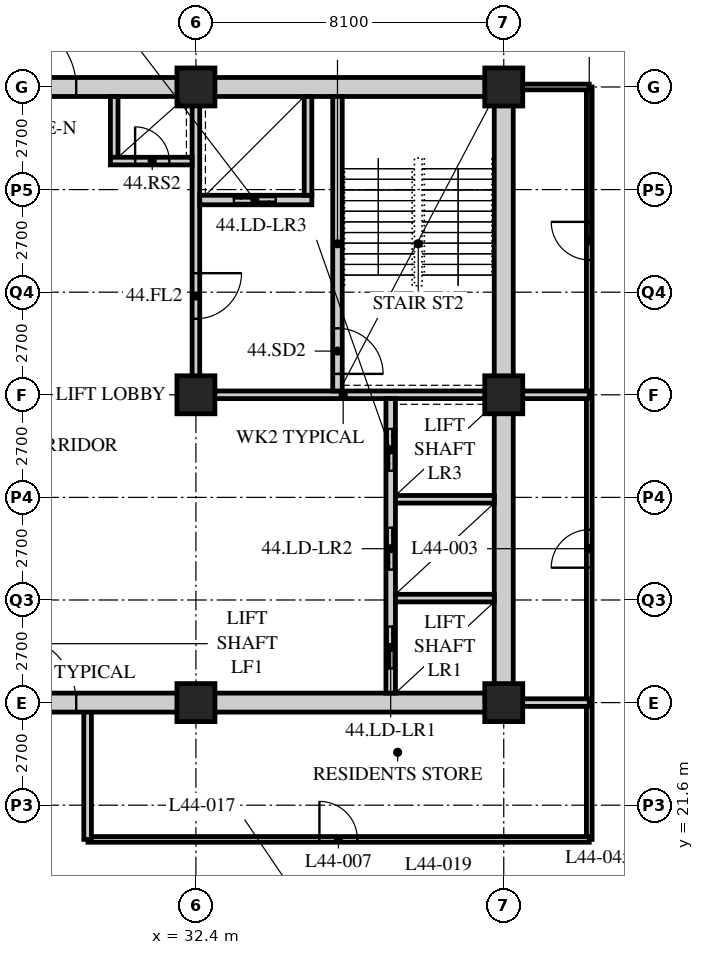
"""IFC4 building model, lengths in metres.
Left out: names, types, materials, properties, quantities, classifications, styles, units other than length and angle.
Written with IfcOpenShell. Run it as: python <this file> out.ifc"""

import sys

from ifc_helpers import new_model, si_unit, direction, frame, frame_2d, origin, origin_2d, place, context, subcontext, project, spatial, rectangle, hollow_rectangle, extrude, element, fill, save


model = new_model("IFC4")
c1 = context("Model", 3, precision=1e-05, world=origin(), true_north=direction((0.0, 1.0)))
c2 = subcontext(c1, "Body", "Model", "MODEL_VIEW")
j1 = project(units=[si_unit("LENGTHUNIT", "METRE"), si_unit("PLANEANGLEUNIT", "RADIAN")], contexts=[c1])
p1 = place(None, origin())
s1 = spatial("IfcSite", under=j1, at=p1, CompositionType="ELEMENT")
p2 = place(p1, origin())
s2 = spatial("IfcBuilding", under=s1, at=p2, CompositionType="ELEMENT")
p3 = place(p2, frame((0.0, 0.0, 174.0)))
s3 = spatial("IfcBuildingStorey", under=s2, at=p3, CompositionType="ELEMENT", Elevation=174.0)
for number, where, z_axis, x_axis in (
    (1, (32.4, 24.3, 0.0), (0.0, 0.0, 1.0), (1.0, 0.0, 0.0)),
    (2, (32.4, 32.4, 0.0), (0.0, 0.0, 1.0), (1.0, 0.0, 0.0)),
    (3, (32.4, 40.5, 0.0), (0.0, 0.0, 1.0), (1.0, 0.0, 0.0)),
    (4, (40.5, 24.3, 0.0), (0.0, 0.0, 1.0), (1.0, 0.0, 0.0)),
    (5, (40.5, 32.4, 0.0), (0.0, 0.0, 1.0), (1.0, 0.0, 0.0)),
    (6, (40.5, 40.5, 0.0), (0.0, 0.0, 1.0), (1.0, 0.0, 0.0)),
):
    element("IfcColumn", number, at=place(p3, frame(where, z_axis=z_axis, x_axis=x_axis)), inside=s3, PredefinedType="COLUMN", context=c2, shape_type="SweptSolid", body=[
        extrude(hollow_rectangle(XDim=1.0, YDim=1.0, WallThickness=0.1, at=origin_2d()), origin(), (0.0, 0.0, 1.0), 3.6),
    ])
p4 = place(p3, frame((42.75, 20.7, 0.0), z_axis=(0.0, 0.0, 1.0), x_axis=(0.0, 1.0, 0.0)))
e7 = element("IfcWall", 7, at=p4, inside=s3, PredefinedType="PARTITIONING", context=c2, shape_type="SweptSolid", body=[
    extrude(rectangle(XDim=19.8, YDim=0.15, at=frame_2d((9.9, 0.0))), origin(), (0.0, 0.0, 1.0), 3.39),
])
p5 = place(p4, frame((7.15, 0.0, 0.0)))
e8 = element("IfcOpeningElement", 8, at=p5, cuts=e7, PredefinedType="OPENING", context=c2, shape_type="SweptSolid", body=[
    extrude(rectangle(XDim=1.0, YDim=2.1, at=frame_2d((0.5, 1.05))), frame((0.0, 0.085, 0.0), z_axis=(0.0, -1.0, 0.0), x_axis=(1.0, 0.0, 0.0)), (0.0, 0.0, 1.0), 0.17),
])
p6 = place(p4, frame((15.25, 0.0, 0.0)))
e9 = element("IfcOpeningElement", 9, at=p6, cuts=e7, PredefinedType="OPENING", context=c2, shape_type="SweptSolid", body=[
    extrude(rectangle(XDim=1.0, YDim=2.1, at=frame_2d((0.5, 1.05))), frame((0.0, 0.085, 0.0), z_axis=(0.0, -1.0, 0.0), x_axis=(1.0, 0.0, 0.0)), (0.0, 0.0, 1.0), 0.17),
])
p7 = place(p3, frame((42.75, 40.5, 0.0), z_axis=(0.0, 0.0, 1.0), x_axis=(-1.0, 0.0, 0.0)))
e10 = element("IfcWall", 10, at=p7, inside=s3, PredefinedType="PARTITIONING", context=c2, shape_type="SweptSolid", body=[
    extrude(rectangle(XDim=2.05, YDim=0.15, at=frame_2d((1.025, 0.0))), origin(), (0.0, 0.0, 1.0), 3.39),
])
p8 = place(p3, frame((29.56, 20.7, 0.0), z_axis=(0.0, 0.0, 1.0), x_axis=(1.0, 0.0, 0.0)))
e11 = element("IfcWall", 11, at=p8, inside=s3, PredefinedType="PARTITIONING", context=c2, shape_type="SweptSolid", body=[
    extrude(rectangle(XDim=13.19, YDim=0.15, at=frame_2d((6.595, 0.0))), origin(), (0.0, 0.0, 1.0), 3.39),
])
p9 = place(p8, frame((6.09, 0.0, 0.0)))
e12 = element("IfcOpeningElement", 12, at=p9, cuts=e11, PredefinedType="OPENING", context=c2, shape_type="SweptSolid", body=[
    extrude(rectangle(XDim=1.0, YDim=2.1, at=frame_2d((0.5, 1.05))), frame((0.0, 0.085, 0.0), z_axis=(0.0, -1.0, 0.0), x_axis=(1.0, 0.0, 0.0)), (0.0, 0.0, 1.0), 0.17),
])
p10 = place(p3, frame((40.5, 32.4, 0.0), z_axis=(0.0, 0.0, 1.0), x_axis=(1.0, 0.0, 0.0)))
e13 = element("IfcWall", 13, at=p10, inside=s3, PredefinedType="SOLIDWALL", context=c2, shape_type="SweptSolid", body=[
    extrude(rectangle(XDim=2.25, YDim=0.2, at=frame_2d((1.125, 0.0))), origin(), (0.0, 0.0, 1.0), 3.39),
])
p11 = place(p3, frame((29.55, 20.7, 0.0), z_axis=(0.0, 0.0, 1.0), x_axis=(0.0, 1.0, 0.0)))
e14 = element("IfcWall", 14, at=p11, inside=s3, PredefinedType="SOLIDWALL", context=c2, shape_type="SweptSolid", body=[
    extrude(rectangle(XDim=3.6, YDim=0.2, at=frame_2d((1.8, 0.0))), origin(), (0.0, 0.0, 1.0), 3.39),
])
p12 = place(p3, frame((40.5, 24.3, 0.0), z_axis=(0.0, 0.0, 1.0), x_axis=(1.0, 0.0, 0.0)))
e15 = element("IfcWall", 15, at=p12, inside=s3, PredefinedType="SOLIDWALL", context=c2, shape_type="SweptSolid", body=[
    extrude(rectangle(XDim=2.25, YDim=0.2, at=frame_2d((1.125, 0.0))), origin(), (0.0, 0.0, 1.0), 3.39),
])
p13 = place(p3, frame((15.95, 24.3, 0.0), z_axis=(0.0, 0.0, 1.0), x_axis=(1.0, 0.0, 0.0)))
e16 = element("IfcWall", 16, at=p13, inside=s3, PredefinedType="SOLIDWALL", context=c2, shape_type="SweptSolid", body=[
    extrude(rectangle(XDim=24.8, YDim=0.5, at=frame_2d((12.4, 0.0))), origin(), (0.0, 0.0, 1.0), 2.74),
])
p14 = place(p13, frame((11.5, 0.0, 0.0)))
e17 = element("IfcOpeningElement", 17, at=p14, cuts=e16, PredefinedType="OPENING", context=c2, shape_type="SweptSolid", body=[
    extrude(rectangle(XDim=1.8, YDim=2.4, at=frame_2d((0.9, 1.2))), frame((0.0, 0.26, 0.0), z_axis=(0.0, -1.0, 0.0), x_axis=(1.0, 0.0, 0.0)), (0.0, 0.0, 1.0), 0.52),
])
p15 = place(p3, frame((15.95, 40.5, 0.0), z_axis=(0.0, 0.0, 1.0), x_axis=(1.0, 0.0, 0.0)))
e18 = element("IfcWall", 18, at=p15, inside=s3, PredefinedType="SOLIDWALL", context=c2, shape_type="SweptSolid", body=[
    extrude(rectangle(XDim=24.8, YDim=0.5, at=frame_2d((12.4, 0.0))), origin(), (0.0, 0.0, 1.0), 2.74),
])
p16 = place(p15, frame((11.5, 0.0, 0.0)))
e19 = element("IfcOpeningElement", 19, at=p16, cuts=e18, PredefinedType="OPENING", context=c2, shape_type="SweptSolid", body=[
    extrude(rectangle(XDim=1.8, YDim=2.4, at=frame_2d((0.9, 1.2))), frame((0.0, 0.26, 0.0), z_axis=(0.0, -1.0, 0.0), x_axis=(1.0, 0.0, 0.0)), (0.0, 0.0, 1.0), 0.52),
])
p17 = place(p3, frame((40.5, 24.55, 0.0), z_axis=(0.0, 0.0, 1.0), x_axis=(0.0, 1.0, 0.0)))
e20 = element("IfcWall", 20, at=p17, inside=s3, PredefinedType="SOLIDWALL", context=c2, shape_type="SweptSolid", body=[
    extrude(rectangle(XDim=15.7, YDim=0.5, at=frame_2d((7.85, 0.0))), origin(), (0.0, 0.0, 1.0), 2.778),
])
p18 = place(p3, frame((32.3, 32.4, 0.0), z_axis=(0.0, 0.0, 1.0), x_axis=(1.0, 0.0, 0.0)))
e21 = element("IfcWall", 21, at=p18, inside=s3, PredefinedType="SOLIDWALL", context=c2, shape_type="SweptSolid", body=[
    extrude(rectangle(XDim=7.95, YDim=0.2, at=frame_2d((3.975, 0.0))), origin(), (0.0, 0.0, 1.0), 2.778),
])
p19 = place(p3, frame((32.4, 32.5, 0.0), z_axis=(0.0, 0.0, 1.0), x_axis=(0.0, 1.0, 0.0)))
e22 = element("IfcWall", 22, at=p19, inside=s3, PredefinedType="SOLIDWALL", context=c2, shape_type="SweptSolid", body=[
    extrude(rectangle(XDim=7.75, YDim=0.2, at=frame_2d((3.875, 0.0))), origin(), (0.0, 0.0, 1.0), 2.778),
])
p20 = place(p19, frame((1.9, 0.0, 0.0)))
e23 = element("IfcOpeningElement", 23, at=p20, cuts=e22, PredefinedType="OPENING", context=c2, shape_type="SweptSolid", body=[
    extrude(rectangle(XDim=1.2, YDim=2.1, at=frame_2d((0.6, 1.05))), frame((0.0, 0.11, 0.0), z_axis=(0.0, -1.0, 0.0), x_axis=(1.0, 0.0, 0.0)), (0.0, 0.0, 1.0), 0.22),
])
p21 = place(p3, frame((37.525, 24.55, 0.0), z_axis=(0.0, 0.0, 1.0), x_axis=(0.0, 1.0, 0.0)))
e24 = element("IfcWall", 24, at=p21, inside=s3, PredefinedType="SOLIDWALL", context=c2, shape_type="SweptSolid", body=[
    extrude(rectangle(XDim=7.75, YDim=0.25, at=frame_2d((3.875, 0.0))), origin(), (0.0, 0.0, 1.0), 3.39),
])
p22 = place(p21, frame((0.65, 0.0, 0.0)))
e25 = element("IfcOpeningElement", 25, at=p22, cuts=e24, PredefinedType="OPENING", context=c2, shape_type="SweptSolid", body=[
    extrude(rectangle(XDim=1.1, YDim=2.4, at=frame_2d((0.55, 1.2))), frame((0.0, 0.135, 0.0), z_axis=(0.0, -1.0, 0.0), x_axis=(1.0, 0.0, 0.0)), (0.0, 0.0, 1.0), 0.27),
])
p23 = place(p21, frame((3.25, 0.0, 0.0)))
e26 = element("IfcOpeningElement", 26, at=p23, cuts=e24, PredefinedType="OPENING", context=c2, shape_type="SweptSolid", body=[
    extrude(rectangle(XDim=1.1, YDim=2.4, at=frame_2d((0.55, 1.2))), frame((0.0, 0.135, 0.0), z_axis=(0.0, -1.0, 0.0), x_axis=(1.0, 0.0, 0.0)), (0.0, 0.0, 1.0), 0.27),
])
p24 = place(p21, frame((5.85, 0.0, 0.0)))
e27 = element("IfcOpeningElement", 27, at=p24, cuts=e24, PredefinedType="OPENING", context=c2, shape_type="SweptSolid", body=[
    extrude(rectangle(XDim=1.1, YDim=2.4, at=frame_2d((0.55, 1.2))), frame((0.0, 0.135, 0.0), z_axis=(0.0, -1.0, 0.0), x_axis=(1.0, 0.0, 0.0)), (0.0, 0.0, 1.0), 0.27),
])
for number, where, z_axis, x_axis in (
    (28, (37.65, 27.05, 0.0), (0.0, 0.0, 1.0), (1.0, 0.0, 0.0)),
    (29, (37.65, 29.65, 0.0), (0.0, 0.0, 1.0), (1.0, 0.0, 0.0)),
):
    element("IfcWall", number, at=place(p3, frame(where, z_axis=z_axis, x_axis=x_axis)), inside=s3, PredefinedType="SOLIDWALL", context=c2, shape_type="SweptSolid", body=[
        extrude(rectangle(XDim=2.6, YDim=0.2, at=frame_2d((1.3, 0.0))), origin(), (0.0, 0.0, 1.0), 3.39),
    ])
p25 = place(p3, frame((36.125, 32.5, 0.0), z_axis=(0.0, 0.0, 1.0), x_axis=(0.0, 1.0, 0.0)))
e30 = element("IfcWall", 30, at=p25, inside=s3, PredefinedType="SOLIDWALL", context=c2, shape_type="SweptSolid", body=[
    extrude(rectangle(XDim=7.75, YDim=0.25, at=frame_2d((3.875, 0.0))), origin(), (0.0, 0.0, 1.0), 3.39),
])
p26 = place(p25, frame((0.45, 0.0, 0.0)))
e31 = element("IfcOpeningElement", 31, at=p26, cuts=e30, PredefinedType="OPENING", context=c2, shape_type="SweptSolid", body=[
    extrude(rectangle(XDim=1.2, YDim=2.1, at=frame_2d((0.6, 1.05))), frame((0.0, 0.135, 0.0), z_axis=(0.0, -1.0, 0.0), x_axis=(1.0, 0.0, 0.0)), (0.0, 0.0, 1.0), 0.27),
])
p27 = place(p3, frame((32.5, 37.525, 0.0), z_axis=(0.0, 0.0, 1.0), x_axis=(1.0, 0.0, 0.0)))
e32 = element("IfcWall", 32, at=p27, inside=s3, PredefinedType="SOLIDWALL", context=c2, shape_type="SweptSolid", body=[
    extrude(rectangle(XDim=2.95, YDim=0.25, at=frame_2d((1.475, 0.0))), origin(), (0.0, 0.0, 1.0), 3.39),
])
p28 = place(p27, frame((0.9, 0.0, 0.0)))
e33 = element("IfcOpeningElement", 33, at=p28, cuts=e32, PredefinedType="OPENING", context=c2, shape_type="SweptSolid", body=[
    extrude(rectangle(XDim=1.1, YDim=2.4, at=frame_2d((0.55, 1.2))), frame((0.0, 0.135, 0.0), z_axis=(0.0, -1.0, 0.0), x_axis=(1.0, 0.0, 0.0)), (0.0, 0.0, 1.0), 0.27),
])
p29 = place(p3, frame((35.35, 37.65, 0.0), z_axis=(0.0, 0.0, 1.0), x_axis=(0.0, 1.0, 0.0)))
e34 = element("IfcWall", 34, at=p29, inside=s3, PredefinedType="SOLIDWALL", context=c2, shape_type="SweptSolid", body=[
    extrude(rectangle(XDim=2.6, YDim=0.2, at=frame_2d((1.3, 0.0))), origin(), (0.0, 0.0, 1.0), 3.39),
])
p30 = place(p3, frame((30.25, 38.65, 0.0), z_axis=(0.0, 0.0, 1.0), x_axis=(0.0, 1.0, 0.0)))
e35 = element("IfcWall", 35, at=p30, inside=s3, PredefinedType="SOLIDWALL", context=c2, shape_type="SweptSolid", body=[
    extrude(rectangle(XDim=1.6, YDim=0.2, at=frame_2d((0.8, 0.0))), origin(), (0.0, 0.0, 1.0), 3.39),
])
p31 = place(p3, frame((30.15, 38.55, 0.0), z_axis=(0.0, 0.0, 1.0), x_axis=(1.0, 0.0, 0.0)))
e36 = element("IfcWall", 36, at=p31, inside=s3, PredefinedType="SOLIDWALL", context=c2, shape_type="SweptSolid", body=[
    extrude(rectangle(XDim=2.15, YDim=0.2, at=frame_2d((1.075, 0.0))), origin(), (0.0, 0.0, 1.0), 3.39),
])
p32 = place(p31, frame((0.65, 0.0, 0.0)))
e37 = element("IfcOpeningElement", 37, at=p32, cuts=e36, PredefinedType="OPENING", context=c2, shape_type="SweptSolid", body=[
    extrude(rectangle(XDim=0.9, YDim=2.1, at=frame_2d((0.45, 1.05))), frame((0.0, 0.11, 0.0), z_axis=(0.0, -1.0, 0.0), x_axis=(1.0, 0.0, 0.0)), (0.0, 0.0, 1.0), 0.22),
])
p33 = place(p5, origin())
e38 = element("IfcDoor", 38, at=p33, inside=s3, OperationType="SINGLE_SWING_LEFT", PredefinedType="DOOR", context=c2, shape_type="SweptSolid", body=[
    extrude(rectangle(XDim=1.0, YDim=2.1, at=frame_2d((0.5, 1.05))), frame((0.0, 0.025, 0.0), z_axis=(0.0, -1.0, 0.0), x_axis=(1.0, 0.0, 0.0)), (0.0, 0.0, 1.0), 0.05),
])
fill(e8, e38)
p34 = place(p6, origin())
e39 = element("IfcDoor", 39, at=p34, inside=s3, OperationType="SINGLE_SWING_RIGHT", PredefinedType="DOOR", context=c2, shape_type="SweptSolid", body=[
    extrude(rectangle(XDim=1.0, YDim=2.1, at=frame_2d((0.5, 1.05))), frame((0.0, 0.025, 0.0), z_axis=(0.0, -1.0, 0.0), x_axis=(1.0, 0.0, 0.0)), (0.0, 0.0, 1.0), 0.05),
])
fill(e9, e39)
p35 = place(p9, origin())
e40 = element("IfcDoor", 40, at=p35, inside=s3, OperationType="SINGLE_SWING_LEFT", PredefinedType="DOOR", context=c2, shape_type="SweptSolid", body=[
    extrude(rectangle(XDim=1.0, YDim=2.1, at=frame_2d((0.5, 1.05))), frame((0.0, 0.025, 0.0), z_axis=(0.0, -1.0, 0.0), x_axis=(1.0, 0.0, 0.0)), (0.0, 0.0, 1.0), 0.05),
])
fill(e12, e40)
p36 = place(p26, origin())
e41 = element("IfcDoor", 41, at=p36, inside=s3, OperationType="SINGLE_SWING_RIGHT", PredefinedType="DOOR", context=c2, shape_type="SweptSolid", body=[
    extrude(rectangle(XDim=1.2, YDim=2.1, at=frame_2d((0.6, 1.05))), frame((0.0, 0.025, 0.0), z_axis=(0.0, -1.0, 0.0), x_axis=(1.0, 0.0, 0.0)), (0.0, 0.0, 1.0), 0.05),
])
fill(e31, e41)
p37 = place(p20, origin())
e42 = element("IfcDoor", 42, at=p37, inside=s3, OperationType="SINGLE_SWING_LEFT", PredefinedType="DOOR", context=c2, shape_type="SweptSolid", body=[
    extrude(rectangle(XDim=1.2, YDim=2.1, at=frame_2d((0.6, 1.05))), frame((0.0, 0.025, 0.0), z_axis=(0.0, -1.0, 0.0), x_axis=(1.0, 0.0, 0.0)), (0.0, 0.0, 1.0), 0.05),
])
fill(e23, e42)
p38 = place(p32, origin())
e43 = element("IfcDoor", 43, at=p38, inside=s3, OperationType="SINGLE_SWING_LEFT", PredefinedType="DOOR", context=c2, shape_type="SweptSolid", body=[
    extrude(rectangle(XDim=0.9, YDim=2.1, at=frame_2d((0.45, 1.05))), frame((0.0, 0.025, 0.0), z_axis=(0.0, -1.0, 0.0), x_axis=(1.0, 0.0, 0.0)), (0.0, 0.0, 1.0), 0.05),
])
fill(e37, e43)
p39 = place(p22, origin())
e44 = element("IfcDoor", 44, at=p39, inside=s3, OperationType="DOUBLE_DOOR_SLIDING", PredefinedType="DOOR", context=c2, shape_type="SweptSolid", body=[
    extrude(rectangle(XDim=1.1, YDim=2.4, at=frame_2d((0.55, 1.2))), frame((0.0, 0.025, 0.0), z_axis=(0.0, -1.0, 0.0), x_axis=(1.0, 0.0, 0.0)), (0.0, 0.0, 1.0), 0.05),
])
fill(e25, e44)
p40 = place(p23, origin())
e45 = element("IfcDoor", 45, at=p40, inside=s3, OperationType="DOUBLE_DOOR_SLIDING", PredefinedType="DOOR", context=c2, shape_type="SweptSolid", body=[
    extrude(rectangle(XDim=1.1, YDim=2.4, at=frame_2d((0.55, 1.2))), frame((0.0, 0.025, 0.0), z_axis=(0.0, -1.0, 0.0), x_axis=(1.0, 0.0, 0.0)), (0.0, 0.0, 1.0), 0.05),
])
fill(e26, e45)
p41 = place(p24, origin())
e46 = element("IfcDoor", 46, at=p41, inside=s3, OperationType="DOUBLE_DOOR_SLIDING", PredefinedType="DOOR", context=c2, shape_type="SweptSolid", body=[
    extrude(rectangle(XDim=1.1, YDim=2.4, at=frame_2d((0.55, 1.2))), frame((0.0, 0.025, 0.0), z_axis=(0.0, -1.0, 0.0), x_axis=(1.0, 0.0, 0.0)), (0.0, 0.0, 1.0), 0.05),
])
fill(e27, e46)
p42 = place(p28, origin())
e47 = element("IfcDoor", 47, at=p42, inside=s3, OperationType="DOUBLE_DOOR_SLIDING", PredefinedType="DOOR", context=c2, shape_type="SweptSolid", body=[
    extrude(rectangle(XDim=1.1, YDim=2.4, at=frame_2d((0.55, 1.2))), frame((0.0, 0.025, 0.0), z_axis=(0.0, -1.0, 0.0), x_axis=(1.0, 0.0, 0.0)), (0.0, 0.0, 1.0), 0.05),
])
fill(e33, e47)
p43 = place(p14, origin())
e48 = element("IfcDoor", 48, at=p43, inside=s3, OperationType="DOUBLE_DOOR_SINGLE_SWING", PredefinedType="DOOR", context=c2, shape_type="SweptSolid", body=[
    extrude(rectangle(XDim=1.8, YDim=2.4, at=frame_2d((0.9, 1.2))), frame((0.0, 0.025, 0.0), z_axis=(0.0, -1.0, 0.0), x_axis=(1.0, 0.0, 0.0)), (0.0, 0.0, 1.0), 0.05),
])
fill(e17, e48)
p44 = place(p16, origin())
e49 = element("IfcDoor", 49, at=p44, inside=s3, OperationType="DOUBLE_DOOR_SINGLE_SWING", PredefinedType="DOOR", context=c2, shape_type="SweptSolid", body=[
    extrude(rectangle(XDim=1.8, YDim=2.4, at=frame_2d((0.9, 1.2))), frame((0.0, 0.025, 0.0), z_axis=(0.0, -1.0, 0.0), x_axis=(1.0, 0.0, 0.0)), (0.0, 0.0, 1.0), 0.05),
])
fill(e19, e49)
save(model, sys.argv[1])
